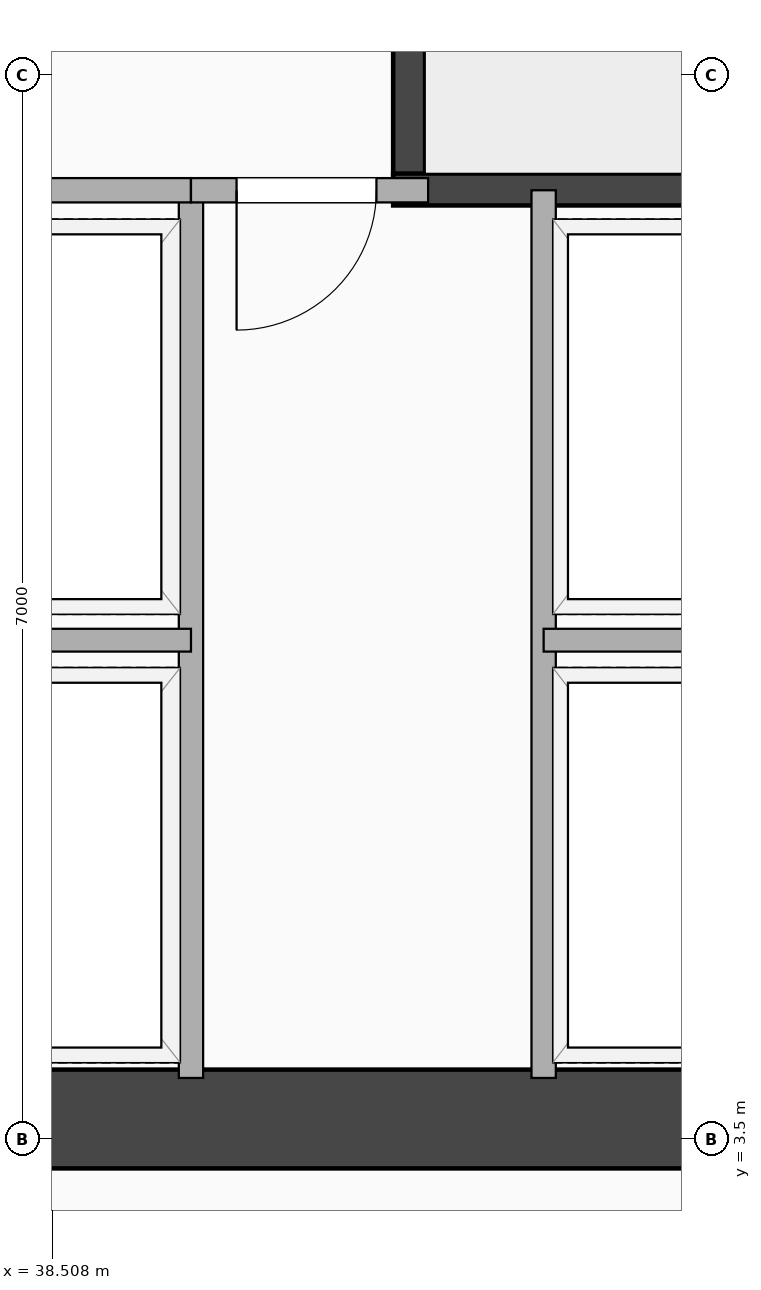
"""IFC4 building model, lengths in metres.
Left out: names, types, materials, properties, quantities, classifications, styles, units other than length and angle.
Written with IfcOpenShell. Run it as: python <this file> out.ifc"""

import sys

from ifc_helpers import new_model, si_unit, direction, frame, frame_2d, origin, place, context, subcontext, project, spatial, rectangle, extrude, element, fill, save


model = new_model("IFC4")
c1 = context("Model", 3, precision=1e-05, world=origin(), true_north=direction((0.0, 1.0)))
c2 = subcontext(c1, "Body", "Model", "MODEL_VIEW")
j1 = project(units=[si_unit("LENGTHUNIT", "METRE"), si_unit("PLANEANGLEUNIT", "RADIAN")], contexts=[c1])
p1 = place(None, origin())
s1 = spatial("IfcSite", under=j1, at=p1, CompositionType="ELEMENT")
p2 = place(p1, origin())
s2 = spatial("IfcBuilding", under=s1, at=p2, CompositionType="ELEMENT")
p3 = place(p2, frame((0.0, 0.0, 5.4)))
s3 = spatial("IfcBuildingStorey", under=s2, at=p3, CompositionType="ELEMENT", Elevation=5.4)
p4 = place(p3, frame((20.3, 3.63, 0.0), z_axis=(0.0, 0.0, 1.0), x_axis=(1.0, 0.0, 0.0)))
e1 = element("IfcWall", 1, at=p4, inside=s3, PredefinedType="SHEAR", context=c2, shape_type="SweptSolid", body=[
    extrude(rectangle(XDim=24.5, YDim=0.65, at=frame_2d((12.25, 0.0))), origin(), (0.0, 0.0, 1.0), 4.3),
])
p5 = place(p3, frame((40.855, 9.745, 0.0), z_axis=(0.0, 0.0, 1.0), x_axis=(0.0, 1.0, 0.0)))
e2 = element("IfcWall", 2, at=p5, inside=s3, PredefinedType="SHEAR", context=c2, shape_type="SweptSolid", body=[
    extrude(rectangle(XDim=8.01, YDim=0.21, at=frame_2d((4.005, 0.0))), origin(), (0.0, 0.0, 1.0), 4.3),
])
p6 = place(p3, frame((40.75, 9.745, 0.0), z_axis=(0.0, 0.0, 1.0), x_axis=(1.0, 0.0, 0.0)))
e3 = element("IfcWall", 3, at=p6, inside=s3, PredefinedType="SHEAR", context=c2, shape_type="SweptSolid", body=[
    extrude(rectangle(XDim=3.66, YDim=0.21, at=frame_2d((1.83, 0.0))), origin(), (0.0, 0.0, 1.0), 4.3),
])
for number, where, z_axis, x_axis in (
    (4, (39.42, 3.9, 0.0), (0.0, 0.0, 1.0), (0.0, 1.0, 0.0)),
    (5, (41.74, 3.9, 0.0), (0.0, 0.0, 1.0), (0.0, 1.0, 0.0)),
):
    element("IfcWall", number, at=place(p3, frame(where, z_axis=z_axis, x_axis=x_axis)), inside=s3, PredefinedType="PARTITIONING", context=c2, shape_type="SweptSolid", body=[
        extrude(rectangle(XDim=5.84, YDim=0.16, at=frame_2d((2.92, 0.0))), origin(), (0.0, 0.0, 1.0), 3.373),
    ])
p7 = place(p3, frame((37.25, 6.78, 0.0), z_axis=(0.0, 0.0, 1.0), x_axis=(1.0, 0.0, 0.0)))
e6 = element("IfcWall", 6, at=p7, inside=s3, PredefinedType="PARTITIONING", context=c2, shape_type="SweptSolid", body=[
    extrude(rectangle(XDim=2.17, YDim=0.15, at=frame_2d((1.085, 0.0))), origin(), (0.0, 0.0, 1.0), 3.43),
])
p8 = place(p3, frame((41.74, 6.78, 0.0), z_axis=(0.0, 0.0, 1.0), x_axis=(1.0, 0.0, 0.0)))
e7 = element("IfcWall", 7, at=p8, inside=s3, PredefinedType="PARTITIONING", context=c2, shape_type="SweptSolid", body=[
    extrude(rectangle(XDim=2.66, YDim=0.15, at=frame_2d((1.33, 0.0))), origin(), (0.0, 0.0, 1.0), 3.43),
])
p9 = place(p3, frame((37.25, 9.74, 0.0), z_axis=(0.0, 0.0, 1.0), x_axis=(1.0, 0.0, 0.0)))
e8 = element("IfcWall", 8, at=p9, inside=s3, PredefinedType="PARTITIONING", context=c2, shape_type="SweptSolid", body=[
    extrude(rectangle(XDim=2.17, YDim=0.16, at=frame_2d((1.085, 0.0))), origin(), (0.0, 0.0, 1.0), 3.43),
])
p10 = place(p3, frame((39.42, 9.74, 0.0), z_axis=(0.0, 0.0, 1.0), x_axis=(1.0, 0.0, 0.0)))
e9 = element("IfcWall", 9, at=p10, inside=s3, PredefinedType="PARTITIONING", context=c2, shape_type="SweptSolid", body=[
    extrude(rectangle(XDim=1.56, YDim=0.16, at=frame_2d((0.78, 0.0))), origin(), (0.0, 0.0, 1.0), 4.3),
])
p11 = place(p10, frame((0.3, 0.0, 0.0)))
e10 = element("IfcOpeningElement", 10, at=p11, cuts=e9, PredefinedType="OPENING", context=c2, shape_type="SweptSolid", body=[
    extrude(rectangle(XDim=0.92, YDim=2.08, at=frame_2d((0.46, 1.04))), frame((0.0, 0.09, 0.0), z_axis=(0.0, -1.0, 0.0), x_axis=(1.0, 0.0, 0.0)), (0.0, 0.0, 1.0), 0.18),
])
p12 = place(p11, origin())
e11 = element("IfcDoor", 11, at=p12, inside=s3, OperationType="SINGLE_SWING_LEFT", PredefinedType="DOOR", context=c2, shape_type="SweptSolid", body=[
    extrude(rectangle(XDim=0.92, YDim=2.08, at=frame_2d((0.46, 1.04))), frame((0.0, 0.025, 0.0), z_axis=(0.0, -1.0, 0.0), x_axis=(1.0, 0.0, 0.0)), (0.0, 0.0, 1.0), 0.05),
])
fill(e10, e11)
save(model, sys.argv[1])
